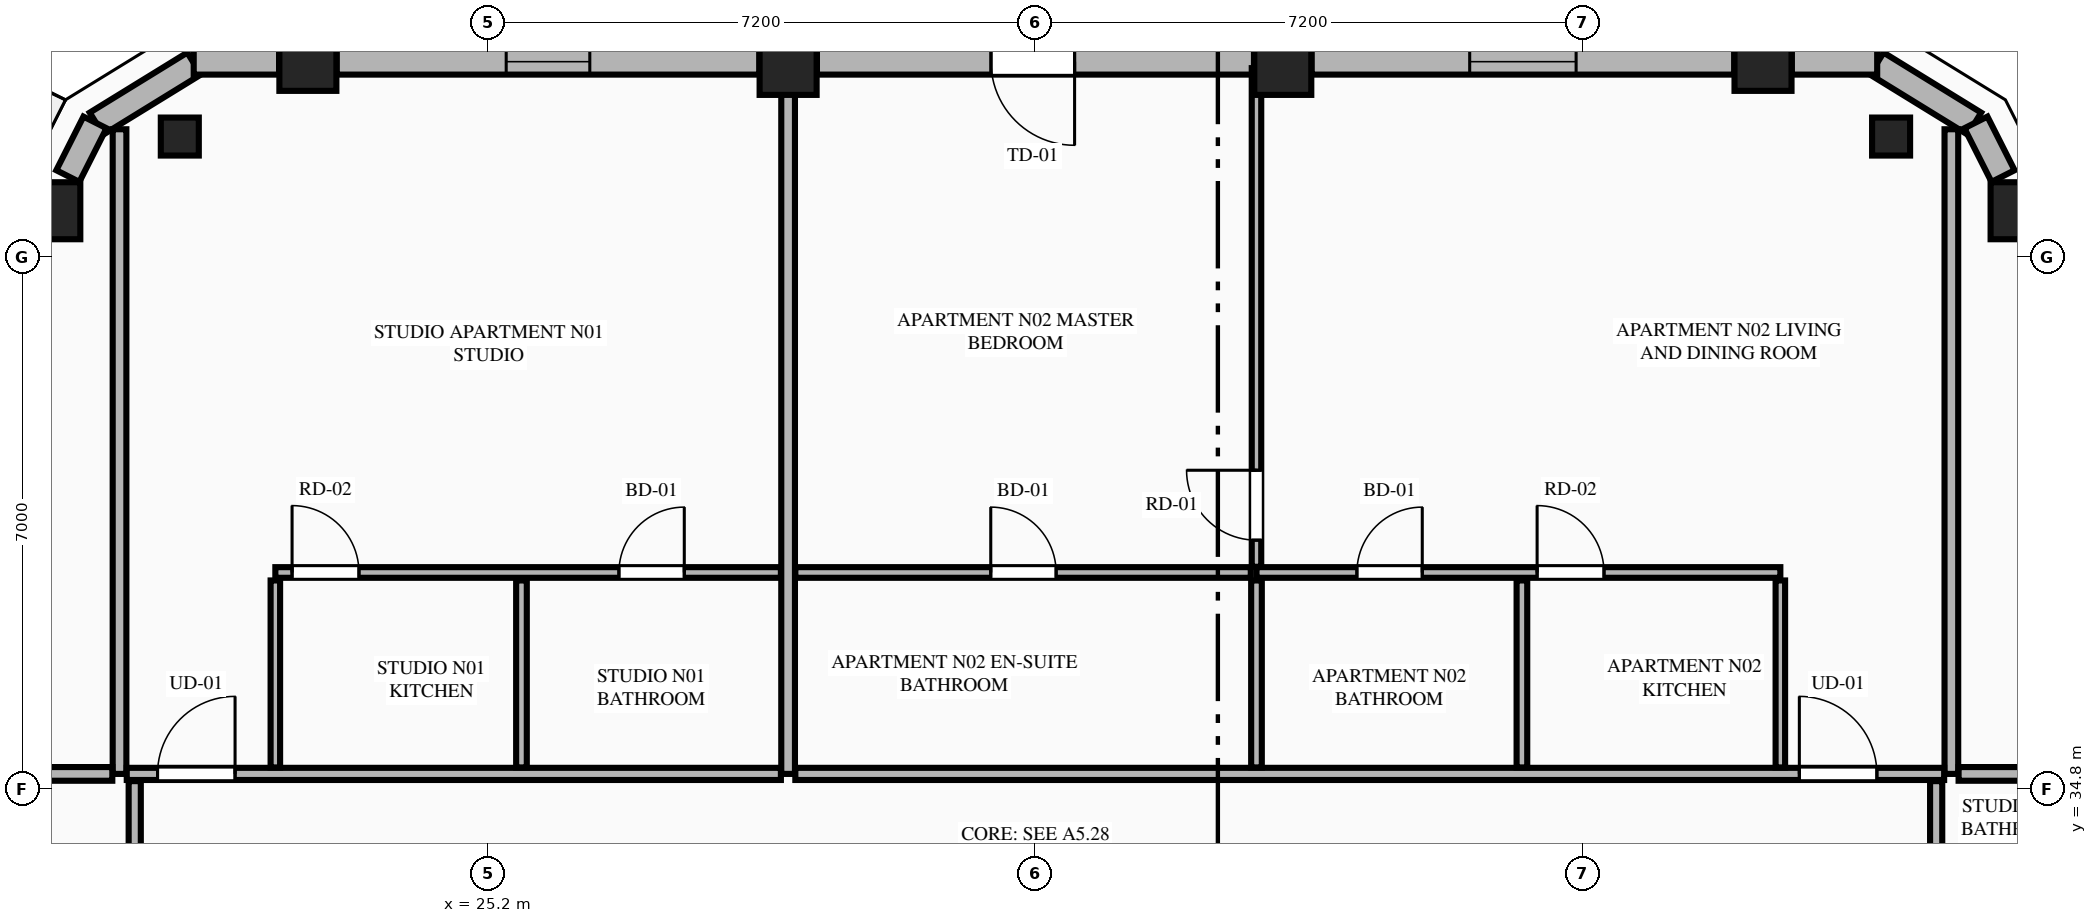
"""IFC4 building model, lengths in metres.
Left out: names, types, materials, properties, quantities, classifications, styles, units other than length and angle.
Written with IfcOpenShell. Run it as: python <this file> out.ifc"""

import sys

from ifc_helpers import new_model, si_unit, direction, frame, frame_2d, origin, origin_2d, place, context, subcontext, project, spatial, rectangle, extrude, element, fill, save


model = new_model("IFC4")
c1 = context("Model", 3, precision=1e-05, world=origin(), true_north=direction((0.0, 1.0)))
c2 = subcontext(c1, "Body", "Model", "MODEL_VIEW")
j1 = project(units=[si_unit("LENGTHUNIT", "METRE"), si_unit("PLANEANGLEUNIT", "RADIAN")], contexts=[c1])
p1 = place(None, origin())
s1 = spatial("IfcSite", under=j1, at=p1, CompositionType="ELEMENT")
p2 = place(p1, origin())
s2 = spatial("IfcBuilding", under=s1, at=p2, CompositionType="ELEMENT")
p3 = place(p2, frame((0.0, 0.0, 248.9)))
s3 = spatial("IfcBuildingStorey", under=s2, at=p3, CompositionType="ELEMENT", Elevation=248.9)
for number, where, z_axis, x_axis in (
    (1, (45.341, 42.409, 0.0), (0.0, 0.0, 1.0), (1.0, 0.0, 0.0)),
    (2, (41.972, 44.361, 0.0), (0.0, 0.0, 1.0), (1.0, 0.0, 0.0)),
    (3, (35.654, 44.308, 0.0), (0.0, 0.0, 1.0), (1.0, 0.0, 0.0)),
    (4, (29.146, 44.308, 0.0), (0.0, 0.0, 1.0), (1.0, 0.0, 0.0)),
    (5, (22.828, 44.361, 0.0), (0.0, 0.0, 1.0), (1.0, 0.0, 0.0)),
    (6, (19.459, 42.409, 0.0), (0.0, 0.0, 1.0), (1.0, 0.0, 0.0)),
):
    element("IfcColumn", number, at=place(p3, frame(where, z_axis=z_axis, x_axis=x_axis)), inside=s3, PredefinedType="COLUMN", context=c2, shape_type="SweptSolid", body=[
        extrude(rectangle(XDim=0.75, YDim=0.75, at=origin_2d()), origin(), (0.0, 0.0, 1.0), 3.65),
    ])
for number, where, z_axis, x_axis in (
    (7, (43.657, 43.385, 0.0), (0.0, 0.0, 1.0), (-0.865, 0.501, 0.0)),
    (8, (21.143, 43.385, 0.0), (0.0, 0.0, 1.0), (-0.865, -0.501, 0.0)),
):
    element("IfcColumn", number, at=place(p3, frame(where, z_axis=z_axis, x_axis=x_axis)), inside=s3, PredefinedType="PILASTER", context=c2, shape_type="SweptSolid", body=[
        extrude(rectangle(XDim=0.5, YDim=0.35, at=origin_2d()), origin(), (0.0, 0.0, 1.0), 3.65),
    ])
for number, where, z_axis, x_axis in (
    (9, (44.753, 43.555, 0.0), (0.0, 0.0, 1.0), (-0.852, 0.524, 0.0)),
    (10, (21.331, 44.345, 0.0), (0.0, 0.0, 1.0), (-0.852, -0.524, 0.0)),
):
    element("IfcWall", number, at=place(p3, frame(where, z_axis=z_axis, x_axis=x_axis)), inside=s3, PredefinedType="STANDARD", context=c2, shape_type="SweptSolid", body=[
        extrude(rectangle(XDim=1.508, YDim=0.34, at=frame_2d((0.754, 0.0))), origin(), (0.0, 0.0, 1.0), 3.45),
    ])
p4 = place(p3, frame((45.13, 42.865, 0.0), z_axis=(0.0, 0.0, 1.0), x_axis=(-0.451159191899, 0.892443490404, 0.0)))
e11 = element("IfcWall", 11, at=p4, inside=s3, PredefinedType="STANDARD", context=c2, shape_type="SweptSolid", body=[
    extrude(rectangle(XDim=0.791, YDim=0.34, at=frame_2d((0.396, 0.0))), origin(), (0.0, 0.0, 1.0), 3.45),
])
p5 = place(p3, frame((43.474, 44.37, 0.0), z_axis=(0.0, 0.0, 1.0), x_axis=(-1.0, 0.0, 0.0)))
e12 = element("IfcWall", 12, at=p5, inside=s3, PredefinedType="STANDARD", context=c2, shape_type="SweptSolid", body=[
    extrude(rectangle(XDim=1.123, YDim=0.34, at=frame_2d((0.562, 0.0))), origin(), (0.0, 0.0, 1.0), 3.45),
])
p6 = place(p3, frame((41.593, 44.37, 0.0), z_axis=(0.0, 0.0, 1.0), x_axis=(-1.0, 0.0, 0.0)))
e13 = element("IfcWall", 13, at=p6, inside=s3, PredefinedType="STANDARD", context=c2, shape_type="SweptSolid", body=[
    extrude(rectangle(XDim=5.56, YDim=0.34, at=frame_2d((2.78, 0.0))), origin(), (0.0, 0.0, 1.0), 2.983),
])
p7 = place(p6, frame((2.08, 0.0, 0.75)))
e14 = element("IfcOpeningElement", 14, at=p7, cuts=e13, PredefinedType="OPENING", context=c2, shape_type="SweptSolid", body=[
    extrude(rectangle(XDim=1.4, YDim=2.05, at=frame_2d((0.7, 1.025))), frame((0.0, 0.18, 0.0), z_axis=(0.0, -1.0, 0.0), x_axis=(1.0, 0.0, 0.0)), (0.0, 0.0, 1.0), 0.36),
])
p8 = place(p3, frame((35.275, 44.37, 0.0), z_axis=(0.0, 0.0, 1.0), x_axis=(-1.0, 0.0, 0.0)))
e15 = element("IfcWall", 15, at=p8, inside=s3, PredefinedType="STANDARD", context=c2, shape_type="SweptSolid", body=[
    extrude(rectangle(XDim=5.75, YDim=0.34, at=frame_2d((2.875, 0.0))), origin(), (0.0, 0.0, 1.0), 2.983),
])
p9 = place(p8, frame((2.36, 0.0, 0.0)))
e16 = element("IfcOpeningElement", 16, at=p9, cuts=e15, PredefinedType="OPENING", context=c2, shape_type="SweptSolid", body=[
    extrude(rectangle(XDim=1.1, YDim=2.25, at=frame_2d((0.55, 1.125))), frame((0.0, 0.18, 0.0), z_axis=(0.0, -1.0, 0.0), x_axis=(1.0, 0.0, 0.0)), (0.0, 0.0, 1.0), 0.36),
])
p10 = place(p3, frame((28.767, 44.37, 0.0), z_axis=(0.0, 0.0, 1.0), x_axis=(-1.0, 0.0, 0.0)))
e17 = element("IfcWall", 17, at=p10, inside=s3, PredefinedType="STANDARD", context=c2, shape_type="SweptSolid", body=[
    extrude(rectangle(XDim=5.56, YDim=0.34, at=frame_2d((2.78, 0.0))), origin(), (0.0, 0.0, 1.0), 2.983),
])
p11 = place(p10, frame((2.23, 0.0, 0.75)))
e18 = element("IfcOpeningElement", 18, at=p11, cuts=e17, PredefinedType="OPENING", context=c2, shape_type="SweptSolid", body=[
    extrude(rectangle(XDim=1.1, YDim=2.0, at=frame_2d((0.55, 1.0))), frame((0.0, 0.18, 0.0), z_axis=(0.0, -1.0, 0.0), x_axis=(1.0, 0.0, 0.0)), (0.0, 0.0, 1.0), 0.36),
])
p12 = place(p3, frame((22.449, 44.37, 0.0), z_axis=(0.0, 0.0, 1.0), x_axis=(-1.0, 0.0, 0.0)))
e19 = element("IfcWall", 19, at=p12, inside=s3, PredefinedType="STANDARD", context=c2, shape_type="SweptSolid", body=[
    extrude(rectangle(XDim=1.123, YDim=0.34, at=frame_2d((0.562, 0.0))), origin(), (0.0, 0.0, 1.0), 3.45),
])
p13 = place(p3, frame((20.027, 43.571, 0.0), z_axis=(0.0, 0.0, 1.0), x_axis=(-0.451404919072, -0.89231922485, 0.0)))
e20 = element("IfcWall", 20, at=p13, inside=s3, PredefinedType="STANDARD", context=c2, shape_type="SweptSolid", body=[
    extrude(rectangle(XDim=0.791, YDim=0.34, at=frame_2d((0.396, 0.0))), origin(), (0.0, 0.0, 1.0), 3.45),
])
p14 = place(p3, frame((20.35, 35.0, 0.0), z_axis=(0.0, 0.0, 1.0), x_axis=(0.0, 1.0, 0.0)))
e21 = element("IfcWall", 21, at=p14, inside=s3, PredefinedType="PARTITIONING", context=c2, shape_type="SweptSolid", body=[
    extrude(rectangle(XDim=8.481, YDim=0.18, at=frame_2d((4.24, 0.0))), origin(), (0.0, 0.0, 1.0), 3.45),
])
p15 = place(p3, frame((29.146, 35.0, 0.0), z_axis=(0.0, 0.0, 1.0), x_axis=(0.0, 1.0, 0.0)))
e22 = element("IfcWall", 22, at=p15, inside=s3, PredefinedType="PARTITIONING", context=c2, shape_type="SweptSolid", body=[
    extrude(rectangle(XDim=9.195, YDim=0.18, at=frame_2d((4.598, 0.0))), origin(), (0.0, 0.0, 1.0), 2.907),
])
p16 = place(p3, frame((44.45, 35.0, 0.0), z_axis=(0.0, 0.0, 1.0), x_axis=(0.0, 1.0, 0.0)))
e23 = element("IfcWall", 23, at=p16, inside=s3, PredefinedType="PARTITIONING", context=c2, shape_type="SweptSolid", body=[
    extrude(rectangle(XDim=8.481, YDim=0.18, at=frame_2d((4.24, 0.0))), origin(), (0.0, 0.0, 1.0), 3.45),
])
p17 = place(p3, frame((20.445, 35.0, 0.0), z_axis=(0.0, 0.0, 1.0), x_axis=(1.0, 0.0, 0.0)))
e24 = element("IfcWall", 24, at=p17, inside=s3, PredefinedType="PARTITIONING", context=c2, shape_type="SweptSolid", body=[
    extrude(rectangle(XDim=8.606, YDim=0.16, at=frame_2d((4.303, 0.0))), origin(), (0.0, 0.0, 1.0), 3.45),
])
p18 = place(p17, frame((0.405, 0.0, 0.0)))
e25 = element("IfcOpeningElement", 25, at=p18, cuts=e24, PredefinedType="OPENING", context=c2, shape_type="SweptSolid", body=[
    extrude(rectangle(XDim=1.02, YDim=2.25, at=frame_2d((0.51, 1.125))), frame((0.0, 0.09, 0.0), z_axis=(0.0, -1.0, 0.0), x_axis=(1.0, 0.0, 0.0)), (0.0, 0.0, 1.0), 0.18),
])
p19 = place(p3, frame((22.4, 35.085, 0.0), z_axis=(0.0, 0.0, 1.0), x_axis=(0.0, 1.0, 0.0)))
e26 = element("IfcWall", 26, at=p19, inside=s3, PredefinedType="PARTITIONING", context=c2, shape_type="SweptSolid", body=[
    extrude(rectangle(XDim=2.46, YDim=0.125, at=frame_2d((1.23, 0.0))), origin(), (0.0, 0.0, 1.0), 3.45),
])
p20 = place(p3, frame((22.4, 37.65, 0.0), z_axis=(0.0, 0.0, 1.0), x_axis=(1.0, 0.0, 0.0)))
e27 = element("IfcWall", 27, at=p20, inside=s3, PredefinedType="PLUMBINGWALL", context=c2, shape_type="SweptSolid", body=[
    extrude(rectangle(XDim=6.651, YDim=0.14, at=frame_2d((3.326, 0.0))), origin(), (0.0, 0.0, 1.0), 3.45),
])
p21 = place(p20, frame((4.52, 0.0, 0.0)))
e28 = element("IfcOpeningElement", 28, at=p21, cuts=e27, PredefinedType="OPENING", context=c2, shape_type="SweptSolid", body=[
    extrude(rectangle(XDim=0.86, YDim=2.1, at=frame_2d((0.43, 1.05))), frame((0.0, 0.08, 0.0), z_axis=(0.0, -1.0, 0.0), x_axis=(1.0, 0.0, 0.0)), (0.0, 0.0, 1.0), 0.16),
])
p22 = place(p20, frame((0.22, 0.0, 0.0)))
e29 = element("IfcOpeningElement", 29, at=p22, cuts=e27, PredefinedType="OPENING", context=c2, shape_type="SweptSolid", body=[
    extrude(rectangle(XDim=0.88, YDim=2.15, at=frame_2d((0.44, 1.075))), frame((0.0, 0.08, 0.0), z_axis=(0.0, -1.0, 0.0), x_axis=(1.0, 0.0, 0.0)), (0.0, 0.0, 1.0), 0.16),
])
p23 = place(p3, frame((25.638, 35.085, 0.0), z_axis=(0.0, 0.0, 1.0), x_axis=(0.0, 1.0, 0.0)))
e30 = element("IfcWall", 30, at=p23, inside=s3, PredefinedType="PLUMBINGWALL", context=c2, shape_type="SweptSolid", body=[
    extrude(rectangle(XDim=2.46, YDim=0.14, at=frame_2d((1.23, 0.0))), origin(), (0.0, 0.0, 1.0), 3.45),
])
p24 = place(p3, frame((29.241, 35.0, 0.0), z_axis=(0.0, 0.0, 1.0), x_axis=(1.0, 0.0, 0.0)))
e31 = element("IfcWall", 31, at=p24, inside=s3, PredefinedType="PARTITIONING", context=c2, shape_type="SweptSolid", body=[
    extrude(rectangle(XDim=15.114, YDim=0.16, at=frame_2d((7.557, 0.0))), origin(), (0.0, 0.0, 1.0), 3.45),
])
p25 = place(p24, frame((13.209, 0.0, 0.0)))
e32 = element("IfcOpeningElement", 32, at=p25, cuts=e31, PredefinedType="OPENING", context=c2, shape_type="SweptSolid", body=[
    extrude(rectangle(XDim=1.02, YDim=2.25, at=frame_2d((0.51, 1.125))), frame((0.0, 0.09, 0.0), z_axis=(0.0, -1.0, 0.0), x_axis=(1.0, 0.0, 0.0)), (0.0, 0.0, 1.0), 0.18),
])
p26 = place(p3, frame((42.2, 35.085, 0.0), z_axis=(0.0, 0.0, 1.0), x_axis=(0.0, 1.0, 0.0)))
e33 = element("IfcWall", 33, at=p26, inside=s3, PredefinedType="PARTITIONING", context=c2, shape_type="SweptSolid", body=[
    extrude(rectangle(XDim=2.46, YDim=0.125, at=frame_2d((1.23, 0.0))), origin(), (0.0, 0.0, 1.0), 3.45),
])
p27 = place(p3, frame((35.308, 37.65, 0.0), z_axis=(0.0, 0.0, 1.0), x_axis=(1.0, 0.0, 0.0)))
e34 = element("IfcWall", 34, at=p27, inside=s3, PredefinedType="PLUMBINGWALL", context=c2, shape_type="SweptSolid", body=[
    extrude(rectangle(XDim=6.892, YDim=0.14, at=frame_2d((3.446, 0.0))), origin(), (0.0, 0.0, 1.0), 3.45),
])
p28 = place(p27, frame((1.321, 0.0, 0.0)))
e35 = element("IfcOpeningElement", 35, at=p28, cuts=e34, PredefinedType="OPENING", context=c2, shape_type="SweptSolid", body=[
    extrude(rectangle(XDim=0.86, YDim=2.1, at=frame_2d((0.43, 1.05))), frame((0.0, 0.08, 0.0), z_axis=(0.0, -1.0, 0.0), x_axis=(1.0, 0.0, 0.0)), (0.0, 0.0, 1.0), 0.16),
])
p29 = place(p27, frame((3.692, 0.0, 0.0)))
e36 = element("IfcOpeningElement", 36, at=p29, cuts=e34, PredefinedType="OPENING", context=c2, shape_type="SweptSolid", body=[
    extrude(rectangle(XDim=0.88, YDim=2.15, at=frame_2d((0.44, 1.075))), frame((0.0, 0.08, 0.0), z_axis=(0.0, -1.0, 0.0), x_axis=(1.0, 0.0, 0.0)), (0.0, 0.0, 1.0), 0.16),
])
p30 = place(p3, frame((29.241, 37.65, 0.0), z_axis=(0.0, 0.0, 1.0), x_axis=(1.0, 0.0, 0.0)))
e37 = element("IfcWall", 37, at=p30, inside=s3, PredefinedType="PLUMBINGWALL", context=c2, shape_type="SweptSolid", body=[
    extrude(rectangle(XDim=5.992, YDim=0.14, at=frame_2d((2.996, 0.0))), origin(), (0.0, 0.0, 1.0), 3.45),
])
p31 = place(p30, frame((2.571, 0.0, 0.0)))
e38 = element("IfcOpeningElement", 38, at=p31, cuts=e37, PredefinedType="OPENING", context=c2, shape_type="SweptSolid", body=[
    extrude(rectangle(XDim=0.86, YDim=2.1, at=frame_2d((0.43, 1.05))), frame((0.0, 0.08, 0.0), z_axis=(0.0, -1.0, 0.0), x_axis=(1.0, 0.0, 0.0)), (0.0, 0.0, 1.0), 0.16),
])
for number, where, z_axis, x_axis in (
    (39, (38.8, 35.085, 0.0), (0.0, 0.0, 1.0), (0.0, 1.0, 0.0)),
    (40, (35.308, 35.085, 0.0), (0.0, 0.0, 1.0), (0.0, 1.0, 0.0)),
):
    element("IfcWall", number, at=place(p3, frame(where, z_axis=z_axis, x_axis=x_axis)), inside=s3, PredefinedType="PLUMBINGWALL", context=c2, shape_type="SweptSolid", body=[
        extrude(rectangle(XDim=2.46, YDim=0.14, at=frame_2d((1.23, 0.0))), origin(), (0.0, 0.0, 1.0), 3.45),
    ])
p32 = place(p3, frame((35.308, 37.725, 0.0), z_axis=(0.0, 0.0, 1.0), x_axis=(0.0, 1.0, 0.0)))
e41 = element("IfcWall", 41, at=p32, inside=s3, PredefinedType="PARTITIONING", context=c2, shape_type="SweptSolid", body=[
    extrude(rectangle(XDim=6.56, YDim=0.125, at=frame_2d((3.28, 0.0))), origin(), (0.0, 0.0, 1.0), 3.45),
])
p33 = place(p32, frame((0.35, 0.0, 0.0)))
e42 = element("IfcOpeningElement", 42, at=p33, cuts=e41, PredefinedType="OPENING", context=c2, shape_type="SweptSolid", body=[
    extrude(rectangle(XDim=0.92, YDim=2.15, at=frame_2d((0.46, 1.075))), frame((0.0, 0.073, 0.0), z_axis=(0.0, -1.0, 0.0), x_axis=(1.0, 0.0, 0.0)), (0.0, 0.0, 1.0), 0.145),
])
p34 = place(p3, frame((15.933, 35.0, 0.0), z_axis=(0.0, 0.0, 1.0), x_axis=(1.0, 0.0, 0.0)))
e43 = element("IfcWall", 43, at=p34, inside=s3, PredefinedType="PARTITIONING", context=c2, shape_type="SweptSolid", body=[
    extrude(rectangle(XDim=4.322, YDim=0.18, at=frame_2d((2.161, 0.0))), origin(), (0.0, 0.0, 1.0), 3.45),
])
p35 = place(p3, frame((44.545, 35.0, 0.0), z_axis=(0.0, 0.0, 1.0), x_axis=(1.0, 0.0, 0.0)))
e44 = element("IfcWall", 44, at=p35, inside=s3, PredefinedType="PARTITIONING", context=c2, shape_type="SweptSolid", body=[
    extrude(rectangle(XDim=4.322, YDim=0.18, at=frame_2d((2.161, 0.0))), origin(), (0.0, 0.0, 1.0), 3.45),
])
p36 = place(p3, frame((20.55, 16.495, 0.0), z_axis=(0.0, 0.0, 1.0), x_axis=(0.0, 1.0, 0.0)))
e45 = element("IfcWall", 45, at=p36, inside=s3, PredefinedType="PARTITIONING", context=c2, shape_type="SweptSolid", body=[
    extrude(rectangle(XDim=18.41, YDim=0.16, at=frame_2d((9.205, 0.0))), origin(), (0.0, 0.0, 1.0), 3.137),
])
p37 = place(p36, frame((0.45, 0.0, 0.0)))
e46 = element("IfcOpeningElement", 46, at=p37, cuts=e45, PredefinedType="OPENING", context=c2, shape_type="SweptSolid", body=[
    extrude(rectangle(XDim=1.02, YDim=2.25, at=frame_2d((0.51, 1.125))), frame((0.0, 0.09, 0.0), z_axis=(0.0, -1.0, 0.0), x_axis=(1.0, 0.0, 0.0)), (0.0, 0.0, 1.0), 0.18),
])
p38 = place(p3, frame((44.25, 29.143, 0.0), z_axis=(0.0, 0.0, 1.0), x_axis=(0.0, 1.0, 0.0)))
e47 = element("IfcWall", 47, at=p38, inside=s3, PredefinedType="PARTITIONING", context=c2, shape_type="SweptSolid", body=[
    extrude(rectangle(XDim=5.762, YDim=0.16, at=frame_2d((2.881, 0.0))), origin(), (0.0, 0.0, 1.0), 3.137),
])
p39 = place(p38, frame((0.4, 0.0, 0.0)))
e48 = element("IfcOpeningElement", 48, at=p39, cuts=e47, PredefinedType="OPENING", context=c2, shape_type="SweptSolid", body=[
    extrude(rectangle(XDim=1.02, YDim=2.25, at=frame_2d((0.51, 1.125))), frame((0.0, 0.09, 0.0), z_axis=(0.0, -1.0, 0.0), x_axis=(1.0, 0.0, 0.0)), (0.0, 0.0, 1.0), 0.18),
])
p40 = place(p7, origin())
e49 = element("IfcWindow", 49, at=p40, inside=s3, PartitioningType="SINGLE_PANEL", PredefinedType="WINDOW", context=c2, shape_type="SweptSolid", body=[
    extrude(rectangle(XDim=1.4, YDim=2.05, at=frame_2d((0.7, 1.025))), frame((0.0, 0.03, 0.0), z_axis=(0.0, -1.0, 0.0), x_axis=(1.0, 0.0, 0.0)), (0.0, 0.0, 1.0), 0.06),
])
fill(e14, e49)
p41 = place(p9, origin())
e50 = element("IfcDoor", 50, at=p41, inside=s3, OperationType="SINGLE_SWING_LEFT", PredefinedType="DOOR", context=c2, shape_type="SweptSolid", body=[
    extrude(rectangle(XDim=1.1, YDim=2.25, at=frame_2d((0.55, 1.125))), frame((0.0, 0.025, 0.0), z_axis=(0.0, -1.0, 0.0), x_axis=(1.0, 0.0, 0.0)), (0.0, 0.0, 1.0), 0.05),
])
fill(e16, e50)
p42 = place(p11, origin())
e51 = element("IfcWindow", 51, at=p42, inside=s3, PartitioningType="SINGLE_PANEL", PredefinedType="WINDOW", context=c2, shape_type="SweptSolid", body=[
    extrude(rectangle(XDim=1.1, YDim=2.0, at=frame_2d((0.55, 1.0))), frame((0.0, 0.03, 0.0), z_axis=(0.0, -1.0, 0.0), x_axis=(1.0, 0.0, 0.0)), (0.0, 0.0, 1.0), 0.06),
])
fill(e18, e51)
p43 = place(p21, origin())
e52 = element("IfcDoor", 52, at=p43, inside=s3, OperationType="SINGLE_SWING_RIGHT", PredefinedType="DOOR", context=c2, shape_type="SweptSolid", body=[
    extrude(rectangle(XDim=0.86, YDim=2.1, at=frame_2d((0.43, 1.05))), frame((0.0, 0.025, 0.0), z_axis=(0.0, -1.0, 0.0), x_axis=(1.0, 0.0, 0.0)), (0.0, 0.0, 1.0), 0.05),
])
fill(e28, e52)
p44 = place(p18, origin())
e53 = element("IfcDoor", 53, at=p44, inside=s3, OperationType="SINGLE_SWING_RIGHT", PredefinedType="DOOR", context=c2, shape_type="SweptSolid", body=[
    extrude(rectangle(XDim=1.02, YDim=2.25, at=frame_2d((0.51, 1.125))), frame((0.0, 0.025, 0.0), z_axis=(0.0, -1.0, 0.0), x_axis=(1.0, 0.0, 0.0)), (0.0, 0.0, 1.0), 0.05),
])
fill(e25, e53)
p45 = place(p22, origin())
e54 = element("IfcDoor", 54, at=p45, inside=s3, OperationType="SINGLE_SWING_LEFT", PredefinedType="DOOR", context=c2, shape_type="SweptSolid", body=[
    extrude(rectangle(XDim=0.88, YDim=2.15, at=frame_2d((0.44, 1.075))), frame((0.0, 0.025, 0.0), z_axis=(0.0, -1.0, 0.0), x_axis=(1.0, 0.0, 0.0)), (0.0, 0.0, 1.0), 0.05),
])
fill(e29, e54)
p46 = place(p28, origin())
e55 = element("IfcDoor", 55, at=p46, inside=s3, OperationType="SINGLE_SWING_RIGHT", PredefinedType="DOOR", context=c2, shape_type="SweptSolid", body=[
    extrude(rectangle(XDim=0.86, YDim=2.1, at=frame_2d((0.43, 1.05))), frame((0.0, 0.025, 0.0), z_axis=(0.0, -1.0, 0.0), x_axis=(1.0, 0.0, 0.0)), (0.0, 0.0, 1.0), 0.05),
])
fill(e35, e55)
p47 = place(p31, origin())
e56 = element("IfcDoor", 56, at=p47, inside=s3, OperationType="SINGLE_SWING_LEFT", PredefinedType="DOOR", context=c2, shape_type="SweptSolid", body=[
    extrude(rectangle(XDim=0.86, YDim=2.1, at=frame_2d((0.43, 1.05))), frame((0.0, 0.025, 0.0), z_axis=(0.0, -1.0, 0.0), x_axis=(1.0, 0.0, 0.0)), (0.0, 0.0, 1.0), 0.05),
])
fill(e38, e56)
p48 = place(p25, origin())
e57 = element("IfcDoor", 57, at=p48, inside=s3, OperationType="SINGLE_SWING_LEFT", PredefinedType="DOOR", context=c2, shape_type="SweptSolid", body=[
    extrude(rectangle(XDim=1.02, YDim=2.25, at=frame_2d((0.51, 1.125))), frame((0.0, 0.025, 0.0), z_axis=(0.0, -1.0, 0.0), x_axis=(1.0, 0.0, 0.0)), (0.0, 0.0, 1.0), 0.05),
])
fill(e32, e57)
p49 = place(p29, origin())
e58 = element("IfcDoor", 58, at=p49, inside=s3, OperationType="SINGLE_SWING_LEFT", PredefinedType="DOOR", context=c2, shape_type="SweptSolid", body=[
    extrude(rectangle(XDim=0.88, YDim=2.15, at=frame_2d((0.44, 1.075))), frame((0.0, 0.025, 0.0), z_axis=(0.0, -1.0, 0.0), x_axis=(1.0, 0.0, 0.0)), (0.0, 0.0, 1.0), 0.05),
])
fill(e36, e58)
p50 = place(p33, origin())
e59 = element("IfcDoor", 59, at=p50, inside=s3, OperationType="SINGLE_SWING_RIGHT", PredefinedType="DOOR", context=c2, shape_type="SweptSolid", body=[
    extrude(rectangle(XDim=0.92, YDim=2.15, at=frame_2d((0.46, 1.075))), frame((0.0, 0.025, 0.0), z_axis=(0.0, -1.0, 0.0), x_axis=(1.0, 0.0, 0.0)), (0.0, 0.0, 1.0), 0.05),
])
fill(e42, e59)
save(model, sys.argv[1])
